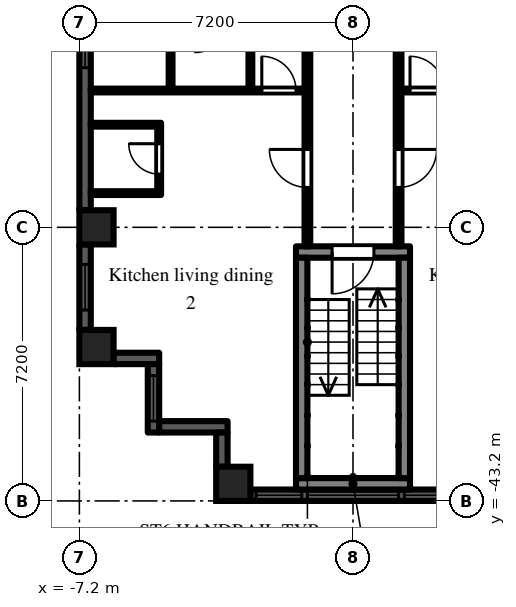
"""IFC4 building model, lengths in metres.
Left out: names, types, materials, properties, quantities, classifications, styles, units other than length and angle.
Written with IfcOpenShell. Run it as: python <this file> out.ifc"""

import sys

from ifc_helpers import new_model, si_unit, direction, frame, frame_2d, origin, origin_2d, place, context, subcontext, project, spatial, rectangle, extrude, element, fill, save


model = new_model("IFC4")
c1 = context("Model", 3, precision=1e-05, world=origin(), true_north=direction((0.0, 1.0)))
c2 = subcontext(c1, "Body", "Model", "MODEL_VIEW")
j1 = project(units=[si_unit("LENGTHUNIT", "METRE"), si_unit("PLANEANGLEUNIT", "RADIAN")], contexts=[c1])
p1 = place(None, origin())
s1 = spatial("IfcSite", under=j1, at=p1, CompositionType="ELEMENT")
p2 = place(p1, origin())
s2 = spatial("IfcBuilding", under=s1, at=p2, CompositionType="ELEMENT")
p3 = place(p2, frame((0.0, 0.0, 93.9)))
s3 = spatial("IfcBuildingStorey", under=s2, at=p3, CompositionType="ELEMENT", Elevation=93.9)
for number, where, z_axis, x_axis in (
    (1, (-6.75, -39.15, 0.0), (0.0, 0.0, 1.0), (1.0, 0.0, 0.0)),
    (2, (-6.75, -36.0, 0.0), (0.0, 0.0, 1.0), (1.0, 0.0, 0.0)),
    (3, (-3.15, -42.75, 0.0), (0.0, 0.0, 1.0), (1.0, 0.0, 0.0)),
):
    element("IfcColumn", number, at=place(p3, frame(where, z_axis=z_axis, x_axis=x_axis)), inside=s3, PredefinedType="COLUMN", context=c2, shape_type="SweptSolid", body=[
        extrude(rectangle(XDim=0.9, YDim=0.9, at=origin_2d()), origin(), (0.0, 0.0, 1.0), 3.0),
    ])
p4 = place(p3, frame((-7.05, -29.25, 0.0), z_axis=(0.0, 0.0, 1.0), x_axis=(0.0, -1.0, 0.0)))
e4 = element("IfcWall", 4, at=p4, inside=s3, PredefinedType="SOLIDWALL", context=c2, shape_type="SweptSolid", body=[
    extrude(rectangle(XDim=6.3, YDim=0.3, at=frame_2d((3.15, 0.0))), origin(), (0.0, 0.0, 1.0), 2.1),
])
p5 = place(p4, frame((0.15, 0.0, 0.2)))
e5 = element("IfcOpeningElement", 5, at=p5, cuts=e4, PredefinedType="OPENING", context=c2, shape_type="SweptSolid", body=[
    extrude(rectangle(XDim=2.4, YDim=1.85, at=frame_2d((1.2, 0.925))), frame((0.0, 0.16, 0.0), z_axis=(0.0, -1.0, 0.0), x_axis=(1.0, 0.0, 0.0)), (0.0, 0.0, 1.0), 0.32),
])
p6 = place(p3, frame((-7.05, -36.45, 0.0), z_axis=(0.0, 0.0, 1.0), x_axis=(0.0, -1.0, 0.0)))
e6 = element("IfcWall", 6, at=p6, inside=s3, PredefinedType="SOLIDWALL", context=c2, shape_type="SweptSolid", body=[
    extrude(rectangle(XDim=2.25, YDim=0.3, at=frame_2d((1.125, 0.0))), origin(), (0.0, 0.0, 1.0), 2.1),
])
p7 = place(p6, frame((0.525, 0.0, 0.2)))
e7 = element("IfcOpeningElement", 7, at=p7, cuts=e6, PredefinedType="OPENING", context=c2, shape_type="SweptSolid", body=[
    extrude(rectangle(XDim=1.2, YDim=1.85, at=frame_2d((0.6, 0.925))), frame((0.0, 0.16, 0.0), z_axis=(0.0, -1.0, 0.0), x_axis=(1.0, 0.0, 0.0)), (0.0, 0.0, 1.0), 0.32),
])
p8 = place(p3, frame((-6.3, -39.45, 0.0), z_axis=(0.0, 0.0, 1.0), x_axis=(1.0, 0.0, 0.0)))
e8 = element("IfcWall", 8, at=p8, inside=s3, PredefinedType="SOLIDWALL", context=c2, shape_type="SweptSolid", body=[
    extrude(rectangle(XDim=1.2, YDim=0.3, at=frame_2d((0.6, 0.0))), origin(), (0.0, 0.0, 1.0), 2.575),
])
p9 = place(p3, frame((-5.25, -39.6, 0.0), z_axis=(0.0, 0.0, 1.0), x_axis=(0.0, -1.0, 0.0)))
e9 = element("IfcWall", 9, at=p9, inside=s3, PredefinedType="SOLIDWALL", context=c2, shape_type="SweptSolid", body=[
    extrude(rectangle(XDim=1.8, YDim=0.3, at=frame_2d((0.9, 0.0))), origin(), (0.0, 0.0, 1.0), 2.575),
])
p10 = place(p9, frame((0.3, 0.0, 0.2)))
e10 = element("IfcOpeningElement", 10, at=p10, cuts=e9, PredefinedType="OPENING", context=c2, shape_type="SweptSolid", body=[
    extrude(rectangle(XDim=1.2, YDim=1.85, at=frame_2d((0.6, 0.925))), frame((0.0, 0.16, 0.0), z_axis=(0.0, -1.0, 0.0), x_axis=(1.0, 0.0, 0.0)), (0.0, 0.0, 1.0), 0.32),
])
p11 = place(p3, frame((-5.1, -41.25, 0.0), z_axis=(0.0, 0.0, 1.0), x_axis=(1.0, 0.0, 0.0)))
e11 = element("IfcWall", 11, at=p11, inside=s3, PredefinedType="SOLIDWALL", context=c2, shape_type="SweptSolid", body=[
    extrude(rectangle(XDim=1.8, YDim=0.3, at=frame_2d((0.9, 0.0))), origin(), (0.0, 0.0, 1.0), 2.575),
])
p12 = place(p3, frame((-3.45, -41.4, 0.0), z_axis=(0.0, 0.0, 1.0), x_axis=(0.0, -1.0, 0.0)))
e12 = element("IfcWall", 12, at=p12, inside=s3, PredefinedType="SOLIDWALL", context=c2, shape_type="SweptSolid", body=[
    extrude(rectangle(XDim=0.9, YDim=0.3, at=frame_2d((0.45, 0.0))), origin(), (0.0, 0.0, 1.0), 2.575),
])
p13 = place(p3, frame((-2.7, -43.05, 0.0), z_axis=(0.0, 0.0, 1.0), x_axis=(1.0, 0.0, 0.0)))
e13 = element("IfcWall", 13, at=p13, inside=s3, PredefinedType="SOLIDWALL", context=c2, shape_type="SweptSolid", body=[
    extrude(rectangle(XDim=5.4, YDim=0.3, at=frame_2d((2.7, 0.0))), origin(), (0.0, 0.0, 1.0), 2.1),
])
p14 = place(p13, frame((1.5, 0.0, 0.2)))
e14 = element("IfcOpeningElement", 14, at=p14, cuts=e13, PredefinedType="OPENING", context=c2, shape_type="SweptSolid", body=[
    extrude(rectangle(XDim=2.4, YDim=1.85, at=frame_2d((1.2, 0.925))), frame((0.0, 0.16, 0.0), z_axis=(0.0, -1.0, 0.0), x_axis=(1.0, 0.0, 0.0)), (0.0, 0.0, 1.0), 0.32),
])
p15 = place(p13, frame((0.15, 0.0, 0.2)))
e15 = element("IfcOpeningElement", 15, at=p15, cuts=e13, PredefinedType="OPENING", context=c2, shape_type="SweptSolid", body=[
    extrude(rectangle(XDim=1.2, YDim=1.85, at=frame_2d((0.6, 0.925))), frame((0.0, 0.16, 0.0), z_axis=(0.0, -1.0, 0.0), x_axis=(1.0, 0.0, 0.0)), (0.0, 0.0, 1.0), 0.32),
])
p16 = place(p13, frame((4.05, 0.0, 0.2)))
e16 = element("IfcOpeningElement", 16, at=p16, cuts=e13, PredefinedType="OPENING", context=c2, shape_type="SweptSolid", body=[
    extrude(rectangle(XDim=1.2, YDim=1.85, at=frame_2d((0.6, 0.925))), frame((0.0, 0.16, 0.0), z_axis=(0.0, -1.0, 0.0), x_axis=(1.0, 0.0, 0.0)), (0.0, 0.0, 1.0), 0.32),
])
p17 = place(p3, frame((-1.5, -36.65, 0.0), z_axis=(0.0, 0.0, 1.0), x_axis=(1.0, 0.0, 0.0)))
e17 = element("IfcWall", 17, at=p17, inside=s3, PredefinedType="SHEAR", context=c2, shape_type="SweptSolid", body=[
    extrude(rectangle(XDim=3.0, YDim=0.3, at=frame_2d((1.5, 0.0))), origin(), (0.0, 0.0, 1.0), 2.575),
])
p18 = place(p17, frame((0.95, 0.0, 0.0)))
e18 = element("IfcOpeningElement", 18, at=p18, cuts=e17, PredefinedType="OPENING", context=c2, shape_type="SweptSolid", body=[
    extrude(rectangle(XDim=1.1, YDim=2.1, at=frame_2d((0.55, 1.05))), frame((0.0, 0.16, 0.0), z_axis=(0.0, -1.0, 0.0), x_axis=(1.0, 0.0, 0.0)), (0.0, 0.0, 1.0), 0.32),
])
p19 = place(p3, frame((-1.5, -42.75, 0.0), z_axis=(0.0, 0.0, 1.0), x_axis=(1.0, 0.0, 0.0)))
e19 = element("IfcWall", 19, at=p19, inside=s3, PredefinedType="SHEAR", context=c2, shape_type="SweptSolid", body=[
    extrude(rectangle(XDim=3.0, YDim=0.3, at=frame_2d((1.5, 0.0))), origin(), (0.0, 0.0, 1.0), 2.575),
])
for number, where, z_axis, x_axis in (
    (20, (-1.35, -36.8, 0.0), (0.0, 0.0, 1.0), (0.0, -1.0, 0.0)),
    (21, (1.35, -36.8, 0.0), (0.0, 0.0, 1.0), (0.0, -1.0, 0.0)),
):
    element("IfcWall", number, at=place(p3, frame(where, z_axis=z_axis, x_axis=x_axis)), inside=s3, PredefinedType="SHEAR", context=c2, shape_type="SweptSolid", body=[
        extrude(rectangle(XDim=5.8, YDim=0.3, at=frame_2d((2.9, 0.0))), origin(), (0.0, 0.0, 1.0), 2.575),
    ])
for number, where, z_axis, x_axis in (
    (22, (-6.9, -35.1, 0.0), (0.0, 0.0, 1.0), (1.0, 0.0, 0.0)),
    (23, (-6.9, -33.3, 0.0), (0.0, 0.0, 1.0), (1.0, 0.0, 0.0)),
):
    element("IfcWall", number, at=place(p3, frame(where, z_axis=z_axis, x_axis=x_axis)), inside=s3, PredefinedType="PARTITIONING", context=c2, shape_type="SweptSolid", body=[
        extrude(rectangle(XDim=1.85, YDim=0.1, at=frame_2d((0.925, 0.0))), origin(), (0.0, 0.0, 1.0), 2.575),
    ])
p20 = place(p3, frame((-6.9, -32.4, 0.0), z_axis=(0.0, 0.0, 1.0), x_axis=(1.0, 0.0, 0.0)))
e24 = element("IfcWall", 24, at=p20, inside=s3, PredefinedType="PARTITIONING", context=c2, shape_type="SweptSolid", body=[
    extrude(rectangle(XDim=5.625, YDim=0.1, at=frame_2d((2.812, 0.0))), origin(), (0.0, 0.0, 1.0), 2.575),
])
p21 = place(p20, frame((4.5, 0.0, 0.0)))
e25 = element("IfcOpeningElement", 25, at=p21, cuts=e24, PredefinedType="OPENING", context=c2, shape_type="SweptSolid", body=[
    extrude(rectangle(XDim=0.9, YDim=2.1, at=frame_2d((0.45, 1.05))), frame((0.0, 0.06, 0.0), z_axis=(0.0, -1.0, 0.0), x_axis=(1.0, 0.0, 0.0)), (0.0, 0.0, 1.0), 0.12),
])
p22 = place(p3, frame((-5.1, -35.05, 0.0), z_axis=(0.0, 0.0, 1.0), x_axis=(0.0, 1.0, 0.0)))
e26 = element("IfcWall", 26, at=p22, inside=s3, PredefinedType="PARTITIONING", context=c2, shape_type="SweptSolid", body=[
    extrude(rectangle(XDim=1.7, YDim=0.1, at=frame_2d((0.85, 0.0))), origin(), (0.0, 0.0, 1.0), 2.575),
])
p23 = place(p22, frame((0.45, 0.0, 0.0)))
e27 = element("IfcOpeningElement", 27, at=p23, cuts=e26, PredefinedType="OPENING", context=c2, shape_type="SweptSolid", body=[
    extrude(rectangle(XDim=0.8, YDim=2.1, at=frame_2d((0.4, 1.05))), frame((0.0, 0.06, 0.0), z_axis=(0.0, -1.0, 0.0), x_axis=(1.0, 0.0, 0.0)), (0.0, 0.0, 1.0), 0.12),
])
p24 = place(p3, frame((-4.8, -32.35, 0.0), z_axis=(0.0, 0.0, 1.0), x_axis=(0.0, 1.0, 0.0)))
e28 = element("IfcWall", 28, at=p24, inside=s3, PredefinedType="PARTITIONING", context=c2, shape_type="SweptSolid", body=[
    extrude(rectangle(XDim=1.8, YDim=0.1, at=frame_2d((0.9, 0.0))), origin(), (0.0, 0.0, 1.0), 2.575),
])
p25 = place(p3, frame((-2.7, -32.35, 0.0), z_axis=(0.0, 0.0, 1.0), x_axis=(0.0, 1.0, 0.0)))
e29 = element("IfcWall", 29, at=p25, inside=s3, PredefinedType="PARTITIONING", context=c2, shape_type="SweptSolid", body=[
    extrude(rectangle(XDim=17.888, YDim=0.1, at=frame_2d((8.944, 0.0))), origin(), (0.0, 0.0, 1.0), 2.575),
])
p26 = place(p25, frame((2.2, 0.0, 0.0)))
e30 = element("IfcOpeningElement", 30, at=p26, cuts=e29, PredefinedType="OPENING", context=c2, shape_type="SweptSolid", body=[
    extrude(rectangle(XDim=0.9, YDim=2.1, at=frame_2d((0.45, 1.05))), frame((0.0, 0.06, 0.0), z_axis=(0.0, -1.0, 0.0), x_axis=(1.0, 0.0, 0.0)), (0.0, 0.0, 1.0), 0.12),
])
p27 = place(p25, frame((4.0, 0.0, 0.0)))
e31 = element("IfcOpeningElement", 31, at=p27, cuts=e29, PredefinedType="OPENING", context=c2, shape_type="SweptSolid", body=[
    extrude(rectangle(XDim=0.9, YDim=2.1, at=frame_2d((0.45, 1.05))), frame((0.0, 0.06, 0.0), z_axis=(0.0, -1.0, 0.0), x_axis=(1.0, 0.0, 0.0)), (0.0, 0.0, 1.0), 0.12),
])
p28 = place(p25, frame((9.4, 0.0, 0.0)))
e32 = element("IfcOpeningElement", 32, at=p28, cuts=e29, PredefinedType="OPENING", context=c2, shape_type="SweptSolid", body=[
    extrude(rectangle(XDim=0.9, YDim=2.1, at=frame_2d((0.45, 1.05))), frame((0.0, 0.06, 0.0), z_axis=(0.0, -1.0, 0.0), x_axis=(1.0, 0.0, 0.0)), (0.0, 0.0, 1.0), 0.12),
])
p29 = place(p25, frame((11.2, 0.0, 0.0)))
e33 = element("IfcOpeningElement", 33, at=p29, cuts=e29, PredefinedType="OPENING", context=c2, shape_type="SweptSolid", body=[
    extrude(rectangle(XDim=0.9, YDim=2.1, at=frame_2d((0.45, 1.05))), frame((0.0, 0.06, 0.0), z_axis=(0.0, -1.0, 0.0), x_axis=(1.0, 0.0, 0.0)), (0.0, 0.0, 1.0), 0.12),
])
p30 = place(p25, frame((14.8, 0.0, 0.0)))
e34 = element("IfcOpeningElement", 34, at=p30, cuts=e29, PredefinedType="OPENING", context=c2, shape_type="SweptSolid", body=[
    extrude(rectangle(XDim=0.9, YDim=2.1, at=frame_2d((0.45, 1.05))), frame((0.0, 0.06, 0.0), z_axis=(0.0, -1.0, 0.0), x_axis=(1.0, 0.0, 0.0)), (0.0, 0.0, 1.0), 0.12),
])
p31 = place(p3, frame((-1.2, -36.5, 0.0), z_axis=(0.0, 0.0, 1.0), x_axis=(0.0, 1.0, 0.0)))
e35 = element("IfcWall", 35, at=p31, inside=s3, PredefinedType="PARTITIONING", context=c2, shape_type="SweptSolid", body=[
    extrude(rectangle(XDim=35.225, YDim=0.15, at=frame_2d((17.613, 0.0))), origin(), (0.0, 0.0, 1.0), 2.575),
])
p32 = place(p31, frame((31.85, 0.0, 0.0)))
e36 = element("IfcOpeningElement", 36, at=p32, cuts=e35, PredefinedType="OPENING", context=c2, shape_type="SweptSolid", body=[
    extrude(rectangle(XDim=0.9, YDim=2.1, at=frame_2d((0.45, 1.05))), frame((0.0, 0.085, 0.0), z_axis=(0.0, -1.0, 0.0), x_axis=(1.0, 0.0, 0.0)), (0.0, 0.0, 1.0), 0.17),
])
p33 = place(p31, frame((27.05, 0.0, 0.0)))
e37 = element("IfcOpeningElement", 37, at=p33, cuts=e35, PredefinedType="OPENING", context=c2, shape_type="SweptSolid", body=[
    extrude(rectangle(XDim=0.9, YDim=2.1, at=frame_2d((0.45, 1.05))), frame((0.0, 0.085, 0.0), z_axis=(0.0, -1.0, 0.0), x_axis=(1.0, 0.0, 0.0)), (0.0, 0.0, 1.0), 0.17),
])
p34 = place(p31, frame((1.55, 0.0, 0.0)))
e38 = element("IfcOpeningElement", 38, at=p34, cuts=e35, PredefinedType="OPENING", context=c2, shape_type="SweptSolid", body=[
    extrude(rectangle(XDim=1.0, YDim=2.1, at=frame_2d((0.5, 1.05))), frame((0.0, 0.085, 0.0), z_axis=(0.0, -1.0, 0.0), x_axis=(1.0, 0.0, 0.0)), (0.0, 0.0, 1.0), 0.17),
])
p35 = place(p3, frame((1.2, -36.5, 0.0), z_axis=(0.0, 0.0, 1.0), x_axis=(0.0, 1.0, 0.0)))
e39 = element("IfcWall", 39, at=p35, inside=s3, PredefinedType="PARTITIONING", context=c2, shape_type="SweptSolid", body=[
    extrude(rectangle(XDim=35.375, YDim=0.15, at=frame_2d((17.688, 0.0))), origin(), (0.0, 0.0, 1.0), 2.575),
])
p36 = place(p35, frame((33.65, 0.0, 0.0)))
e40 = element("IfcOpeningElement", 40, at=p36, cuts=e39, PredefinedType="OPENING", context=c2, shape_type="SweptSolid", body=[
    extrude(rectangle(XDim=0.9, YDim=2.1, at=frame_2d((0.45, 1.05))), frame((0.0, 0.085, 0.0), z_axis=(0.0, -1.0, 0.0), x_axis=(1.0, 0.0, 0.0)), (0.0, 0.0, 1.0), 0.17),
])
p37 = place(p35, frame((30.65, 0.0, 0.0)))
e41 = element("IfcOpeningElement", 41, at=p37, cuts=e39, PredefinedType="OPENING", context=c2, shape_type="SweptSolid", body=[
    extrude(rectangle(XDim=0.9, YDim=2.1, at=frame_2d((0.45, 1.05))), frame((0.0, 0.085, 0.0), z_axis=(0.0, -1.0, 0.0), x_axis=(1.0, 0.0, 0.0)), (0.0, 0.0, 1.0), 0.17),
])
p38 = place(p35, frame((27.45, 0.0, 0.0)))
e42 = element("IfcOpeningElement", 42, at=p38, cuts=e39, PredefinedType="OPENING", context=c2, shape_type="SweptSolid", body=[
    extrude(rectangle(XDim=0.9, YDim=2.1, at=frame_2d((0.45, 1.05))), frame((0.0, 0.085, 0.0), z_axis=(0.0, -1.0, 0.0), x_axis=(1.0, 0.0, 0.0)), (0.0, 0.0, 1.0), 0.17),
])
p39 = place(p35, frame((23.85, 0.0, 0.0)))
e43 = element("IfcOpeningElement", 43, at=p39, cuts=e39, PredefinedType="OPENING", context=c2, shape_type="SweptSolid", body=[
    extrude(rectangle(XDim=0.9, YDim=2.1, at=frame_2d((0.45, 1.05))), frame((0.0, 0.085, 0.0), z_axis=(0.0, -1.0, 0.0), x_axis=(1.0, 0.0, 0.0)), (0.0, 0.0, 1.0), 0.17),
])
p40 = place(p35, frame((1.55, 0.0, 0.0)))
e44 = element("IfcOpeningElement", 44, at=p40, cuts=e39, PredefinedType="OPENING", context=c2, shape_type="SweptSolid", body=[
    extrude(rectangle(XDim=1.0, YDim=2.1, at=frame_2d((0.5, 1.05))), frame((0.0, 0.085, 0.0), z_axis=(0.0, -1.0, 0.0), x_axis=(1.0, 0.0, 0.0)), (0.0, 0.0, 1.0), 0.17),
])
p41 = place(p3, frame((1.275, -32.4, 0.0), z_axis=(0.0, 0.0, 1.0), x_axis=(1.0, 0.0, 0.0)))
e45 = element("IfcWall", 45, at=p41, inside=s3, PredefinedType="PARTITIONING", context=c2, shape_type="SweptSolid", body=[
    extrude(rectangle(XDim=5.625, YDim=0.1, at=frame_2d((2.812, 0.0))), origin(), (0.0, 0.0, 1.0), 2.575),
])
p42 = place(p41, frame((0.225, 0.0, 0.0)))
e46 = element("IfcOpeningElement", 46, at=p42, cuts=e45, PredefinedType="OPENING", context=c2, shape_type="SweptSolid", body=[
    extrude(rectangle(XDim=0.9, YDim=2.1, at=frame_2d((0.45, 1.05))), frame((0.0, 0.06, 0.0), z_axis=(0.0, -1.0, 0.0), x_axis=(1.0, 0.0, 0.0)), (0.0, 0.0, 1.0), 0.12),
])
p43 = place(p5, origin())
e47 = element("IfcWindow", 47, at=p43, inside=s3, PartitioningType="SINGLE_PANEL", PredefinedType="WINDOW", context=c2, shape_type="SweptSolid", body=[
    extrude(rectangle(XDim=2.4, YDim=1.85, at=frame_2d((1.2, 0.925))), frame((0.0, 0.03, 0.0), z_axis=(0.0, -1.0, 0.0), x_axis=(1.0, 0.0, 0.0)), (0.0, 0.0, 1.0), 0.06),
])
fill(e5, e47)
p44 = place(p7, origin())
e48 = element("IfcWindow", 48, at=p44, inside=s3, PartitioningType="SINGLE_PANEL", PredefinedType="WINDOW", context=c2, shape_type="SweptSolid", body=[
    extrude(rectangle(XDim=1.2, YDim=1.85, at=frame_2d((0.6, 0.925))), frame((0.0, 0.03, 0.0), z_axis=(0.0, -1.0, 0.0), x_axis=(1.0, 0.0, 0.0)), (0.0, 0.0, 1.0), 0.06),
])
fill(e7, e48)
p45 = place(p10, origin())
e49 = element("IfcWindow", 49, at=p45, inside=s3, PartitioningType="SINGLE_PANEL", PredefinedType="WINDOW", context=c2, shape_type="SweptSolid", body=[
    extrude(rectangle(XDim=1.2, YDim=1.85, at=frame_2d((0.6, 0.925))), frame((0.0, 0.03, 0.0), z_axis=(0.0, -1.0, 0.0), x_axis=(1.0, 0.0, 0.0)), (0.0, 0.0, 1.0), 0.06),
])
fill(e10, e49)
p46 = place(p14, origin())
e50 = element("IfcWindow", 50, at=p46, inside=s3, PartitioningType="SINGLE_PANEL", PredefinedType="WINDOW", context=c2, shape_type="SweptSolid", body=[
    extrude(rectangle(XDim=2.4, YDim=1.85, at=frame_2d((1.2, 0.925))), frame((0.0, 0.03, 0.0), z_axis=(0.0, -1.0, 0.0), x_axis=(1.0, 0.0, 0.0)), (0.0, 0.0, 1.0), 0.06),
])
fill(e14, e50)
p47 = place(p15, origin())
e51 = element("IfcWindow", 51, at=p47, inside=s3, PartitioningType="SINGLE_PANEL", PredefinedType="WINDOW", context=c2, shape_type="SweptSolid", body=[
    extrude(rectangle(XDim=1.2, YDim=1.85, at=frame_2d((0.6, 0.925))), frame((0.0, 0.03, 0.0), z_axis=(0.0, -1.0, 0.0), x_axis=(1.0, 0.0, 0.0)), (0.0, 0.0, 1.0), 0.06),
])
fill(e15, e51)
p48 = place(p16, origin())
e52 = element("IfcWindow", 52, at=p48, inside=s3, PartitioningType="SINGLE_PANEL", PredefinedType="WINDOW", context=c2, shape_type="SweptSolid", body=[
    extrude(rectangle(XDim=1.2, YDim=1.85, at=frame_2d((0.6, 0.925))), frame((0.0, 0.03, 0.0), z_axis=(0.0, -1.0, 0.0), x_axis=(1.0, 0.0, 0.0)), (0.0, 0.0, 1.0), 0.06),
])
fill(e16, e52)
p49 = place(p18, frame((1.1, 0.0, 0.0), z_axis=(0.0, 0.0, 1.0), x_axis=(-1.0, 0.0, 0.0)))
e53 = element("IfcDoor", 53, at=p49, inside=s3, OperationType="SINGLE_SWING_RIGHT", PredefinedType="DOOR", context=c2, shape_type="SweptSolid", body=[
    extrude(rectangle(XDim=1.1, YDim=2.1, at=frame_2d((0.55, 1.05))), frame((0.0, 0.025, 0.0), z_axis=(0.0, -1.0, 0.0), x_axis=(1.0, 0.0, 0.0)), (0.0, 0.0, 1.0), 0.05),
])
fill(e18, e53)
p50 = place(p40, frame((1.0, 0.0, 0.0), z_axis=(0.0, 0.0, 1.0), x_axis=(-1.0, 0.0, 0.0)))
e54 = element("IfcDoor", 54, at=p50, inside=s3, OperationType="SINGLE_SWING_LEFT", PredefinedType="DOOR", context=c2, shape_type="SweptSolid", body=[
    extrude(rectangle(XDim=1.0, YDim=2.1, at=frame_2d((0.5, 1.05))), frame((0.0, 0.025, 0.0), z_axis=(0.0, -1.0, 0.0), x_axis=(1.0, 0.0, 0.0)), (0.0, 0.0, 1.0), 0.05),
])
fill(e44, e54)
p51 = place(p42, origin())
e55 = element("IfcDoor", 55, at=p51, inside=s3, OperationType="SINGLE_SWING_LEFT", PredefinedType="DOOR", context=c2, shape_type="SweptSolid", body=[
    extrude(rectangle(XDim=0.9, YDim=2.1, at=frame_2d((0.45, 1.05))), frame((0.0, 0.025, 0.0), z_axis=(0.0, -1.0, 0.0), x_axis=(1.0, 0.0, 0.0)), (0.0, 0.0, 1.0), 0.05),
])
fill(e46, e55)
p52 = place(p23, origin())
e56 = element("IfcDoor", 56, at=p52, inside=s3, OperationType="SINGLE_SWING_RIGHT", PredefinedType="DOOR", context=c2, shape_type="SweptSolid", body=[
    extrude(rectangle(XDim=0.8, YDim=2.1, at=frame_2d((0.4, 1.05))), frame((0.0, 0.025, 0.0), z_axis=(0.0, -1.0, 0.0), x_axis=(1.0, 0.0, 0.0)), (0.0, 0.0, 1.0), 0.05),
])
fill(e27, e56)
p53 = place(p34, origin())
e57 = element("IfcDoor", 57, at=p53, inside=s3, OperationType="SINGLE_SWING_RIGHT", PredefinedType="DOOR", context=c2, shape_type="SweptSolid", body=[
    extrude(rectangle(XDim=1.0, YDim=2.1, at=frame_2d((0.5, 1.05))), frame((0.0, 0.025, 0.0), z_axis=(0.0, -1.0, 0.0), x_axis=(1.0, 0.0, 0.0)), (0.0, 0.0, 1.0), 0.05),
])
fill(e38, e57)
p54 = place(p21, origin())
e58 = element("IfcDoor", 58, at=p54, inside=s3, OperationType="SINGLE_SWING_LEFT", PredefinedType="DOOR", context=c2, shape_type="SweptSolid", body=[
    extrude(rectangle(XDim=0.9, YDim=2.1, at=frame_2d((0.45, 1.05))), frame((0.0, 0.025, 0.0), z_axis=(0.0, -1.0, 0.0), x_axis=(1.0, 0.0, 0.0)), (0.0, 0.0, 1.0), 0.05),
])
fill(e25, e58)
save(model, sys.argv[1])
